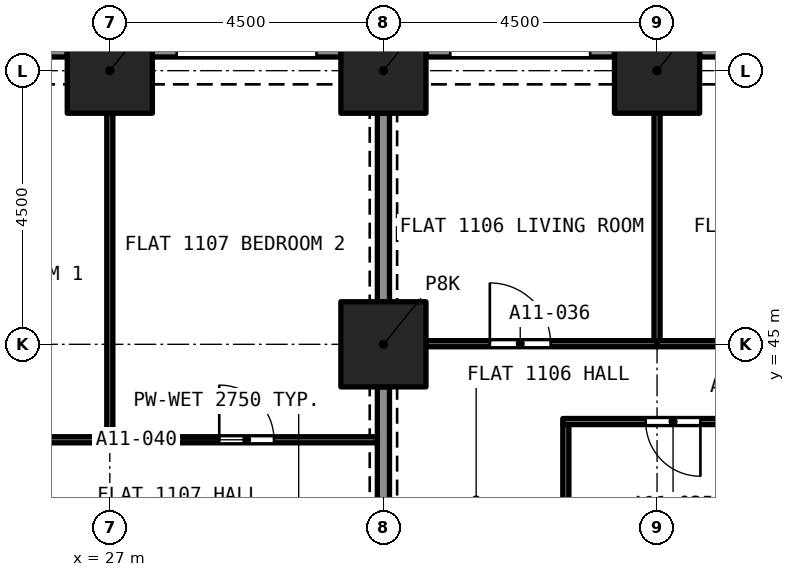
"""IFC4 building model, lengths in metres.
Left out: names, types, materials, properties, quantities, classifications, styles, units other than length and angle.
Written with IfcOpenShell. Run it as: python <this file> out.ifc"""

import sys

from ifc_helpers import new_model, si_unit, direction, frame, frame_2d, origin, origin_2d, place, context, subcontext, project, spatial, rectangle, extrude, element, fill, save


model = new_model("IFC4")
c1 = context("Model", 3, precision=1e-05, world=origin(), true_north=direction((0.0, 1.0)))
c2 = subcontext(c1, "Body", "Model", "MODEL_VIEW")
j1 = project(units=[si_unit("LENGTHUNIT", "METRE"), si_unit("PLANEANGLEUNIT", "RADIAN")], contexts=[c1])
p1 = place(None, origin())
s1 = spatial("IfcSite", under=j1, at=p1, CompositionType="ELEMENT")
p2 = place(p1, origin())
s2 = spatial("IfcBuilding", under=s1, at=p2, CompositionType="ELEMENT")
p3 = place(p2, frame((0.0, 0.0, 46.4)))
s3 = spatial("IfcBuildingStorey", under=s2, at=p3, CompositionType="ELEMENT", Elevation=46.4)
for number, where, z_axis, x_axis in (
    (1, (31.5, 45.0, 0.0), (0.0, 0.0, 1.0), (1.0, 0.0, 0.0)),
    (2, (27.0, 49.5, 0.0), (0.0, 0.0, 1.0), (1.0, 0.0, 0.0)),
    (3, (31.5, 49.5, 0.0), (0.0, 0.0, 1.0), (1.0, 0.0, 0.0)),
    (4, (36.0, 49.5, 0.0), (0.0, 0.0, 1.0), (1.0, 0.0, 0.0)),
):
    element("IfcColumn", number, at=place(p3, frame(where, z_axis=z_axis, x_axis=x_axis)), inside=s3, PredefinedType="COLUMN", context=c2, shape_type="SweptSolid", body=[
        extrude(rectangle(XDim=1.4, YDim=1.4, at=origin_2d()), origin(), (0.0, 0.0, 1.0), 3.2),
    ])
p4 = place(p3, frame((36.7, 49.875, 0.0), z_axis=(0.0, 0.0, 1.0), x_axis=(1.0, 0.0, 0.0)))
e5 = element("IfcWall", 5, at=p4, inside=s3, PredefinedType="SOLIDWALL", context=c2, shape_type="SweptSolid", body=[
    extrude(rectangle(XDim=3.1, YDim=0.3, at=frame_2d((1.55, 0.0))), origin(), (0.0, 0.0, 1.0), 3.2),
])
p5 = place(p4, frame((0.4, 0.0, 0.45)))
e6 = element("IfcOpeningElement", 6, at=p5, cuts=e5, PredefinedType="OPENING", context=c2, shape_type="SweptSolid", body=[
    extrude(rectangle(XDim=2.3, YDim=1.95, at=frame_2d((1.15, 0.975))), frame((0.0, 0.16, 0.0), z_axis=(0.0, -1.0, 0.0), x_axis=(1.0, 0.0, 0.0)), (0.0, 0.0, 1.0), 0.32),
])
p6 = place(p3, frame((32.2, 49.875, 0.0), z_axis=(0.0, 0.0, 1.0), x_axis=(1.0, 0.0, 0.0)))
e7 = element("IfcWall", 7, at=p6, inside=s3, PredefinedType="SOLIDWALL", context=c2, shape_type="SweptSolid", body=[
    extrude(rectangle(XDim=3.1, YDim=0.3, at=frame_2d((1.55, 0.0))), origin(), (0.0, 0.0, 1.0), 3.2),
])
p7 = place(p6, frame((0.4, 0.0, 0.45)))
e8 = element("IfcOpeningElement", 8, at=p7, cuts=e7, PredefinedType="OPENING", context=c2, shape_type="SweptSolid", body=[
    extrude(rectangle(XDim=2.3, YDim=1.95, at=frame_2d((1.15, 0.975))), frame((0.0, 0.16, 0.0), z_axis=(0.0, -1.0, 0.0), x_axis=(1.0, 0.0, 0.0)), (0.0, 0.0, 1.0), 0.32),
])
p8 = place(p3, frame((27.7, 49.875, 0.0), z_axis=(0.0, 0.0, 1.0), x_axis=(1.0, 0.0, 0.0)))
e9 = element("IfcWall", 9, at=p8, inside=s3, PredefinedType="SOLIDWALL", context=c2, shape_type="SweptSolid", body=[
    extrude(rectangle(XDim=3.1, YDim=0.3, at=frame_2d((1.55, 0.0))), origin(), (0.0, 0.0, 1.0), 3.2),
])
p9 = place(p8, frame((0.4, 0.0, 0.45)))
e10 = element("IfcOpeningElement", 10, at=p9, cuts=e9, PredefinedType="OPENING", context=c2, shape_type="SweptSolid", body=[
    extrude(rectangle(XDim=2.3, YDim=1.95, at=frame_2d((1.15, 0.975))), frame((0.0, 0.16, 0.0), z_axis=(0.0, -1.0, 0.0), x_axis=(1.0, 0.0, 0.0)), (0.0, 0.0, 1.0), 0.32),
])
p10 = place(p3, frame((23.2, 49.875, 0.0), z_axis=(0.0, 0.0, 1.0), x_axis=(1.0, 0.0, 0.0)))
e11 = element("IfcWall", 11, at=p10, inside=s3, PredefinedType="SOLIDWALL", context=c2, shape_type="SweptSolid", body=[
    extrude(rectangle(XDim=3.1, YDim=0.3, at=frame_2d((1.55, 0.0))), origin(), (0.0, 0.0, 1.0), 3.2),
])
p11 = place(p10, frame((0.4, 0.0, 0.45)))
e12 = element("IfcOpeningElement", 12, at=p11, cuts=e11, PredefinedType="OPENING", context=c2, shape_type="SweptSolid", body=[
    extrude(rectangle(XDim=2.3, YDim=1.95, at=frame_2d((1.15, 0.975))), frame((0.0, 0.16, 0.0), z_axis=(0.0, -1.0, 0.0), x_axis=(1.0, 0.0, 0.0)), (0.0, 0.0, 1.0), 0.32),
])
p12 = place(p3, frame((36.0, 45.01, 0.0), z_axis=(0.0, 0.0, 1.0), x_axis=(1.0, 0.0, 0.0)))
e13 = element("IfcWall", 13, at=p12, inside=s3, PredefinedType="PARTITIONING", context=c2, shape_type="SweptSolid", body=[
    extrude(rectangle(XDim=4.4, YDim=0.1, at=frame_2d((2.2, 0.0))), origin(), (0.0, 0.0, 1.0), 2.9),
])
p13 = place(p12, frame((1.8, 0.0, 0.0)))
e14 = element("IfcOpeningElement", 14, at=p13, cuts=e13, PredefinedType="OPENING", context=c2, shape_type="SweptSolid", body=[
    extrude(rectangle(XDim=0.9, YDim=2.1, at=frame_2d((0.45, 1.05))), frame((0.0, 0.06, 0.0), z_axis=(0.0, -1.0, 0.0), x_axis=(1.0, 0.0, 0.0)), (0.0, 0.0, 1.0), 0.12),
])
p14 = place(p3, frame((36.0, 45.06, 0.0), z_axis=(0.0, 0.0, 1.0), x_axis=(0.0, 1.0, 0.0)))
e15 = element("IfcWall", 15, at=p14, inside=s3, PredefinedType="PARTITIONING", context=c2, shape_type="SweptSolid", body=[
    extrude(rectangle(XDim=3.74, YDim=0.1, at=frame_2d((1.87, 0.0))), origin(), (0.0, 0.0, 1.0), 2.9),
])
p15 = place(p3, frame((38.027, 43.73, 0.0), z_axis=(0.0, 0.0, 1.0), x_axis=(-1.0, 0.0, 0.0)))
e16 = element("IfcWall", 16, at=p15, inside=s3, PredefinedType="PARTITIONING", context=c2, shape_type="SweptSolid", body=[
    extrude(rectangle(XDim=3.577, YDim=0.1, at=frame_2d((1.788, 0.0))), origin(), (0.0, 0.0, 1.0), 2.9),
])
p16 = place(p15, frame((1.313, 0.0, 0.0)))
e17 = element("IfcOpeningElement", 17, at=p16, cuts=e16, PredefinedType="OPENING", context=c2, shape_type="SweptSolid", body=[
    extrude(rectangle(XDim=0.9, YDim=2.1, at=frame_2d((0.45, 1.05))), frame((0.0, 0.06, 0.0), z_axis=(0.0, -1.0, 0.0), x_axis=(1.0, 0.0, 0.0)), (0.0, 0.0, 1.0), 0.12),
])
p17 = place(p3, frame((34.5, 40.575, 0.0), z_axis=(0.0, 0.0, 1.0), x_axis=(0.0, 1.0, 0.0)))
e18 = element("IfcWall", 18, at=p17, inside=s3, PredefinedType="PARTITIONING", context=c2, shape_type="SweptSolid", body=[
    extrude(rectangle(XDim=3.105, YDim=0.1, at=frame_2d((1.552, 0.0))), origin(), (0.0, 0.0, 1.0), 2.9),
])
p18 = place(p3, frame((32.2, 45.01, 0.0), z_axis=(0.0, 0.0, 1.0), x_axis=(1.0, 0.0, 0.0)))
e19 = element("IfcWall", 19, at=p18, inside=s3, PredefinedType="PARTITIONING", context=c2, shape_type="SweptSolid", body=[
    extrude(rectangle(XDim=3.8, YDim=0.1, at=frame_2d((1.9, 0.0))), origin(), (0.0, 0.0, 1.0), 2.9),
])
p19 = place(p18, frame((1.05, 0.0, 0.0)))
e20 = element("IfcOpeningElement", 20, at=p19, cuts=e19, PredefinedType="OPENING", context=c2, shape_type="SweptSolid", body=[
    extrude(rectangle(XDim=1.0, YDim=2.1, at=frame_2d((0.5, 1.05))), frame((0.0, 0.06, 0.0), z_axis=(0.0, -1.0, 0.0), x_axis=(1.0, 0.0, 0.0)), (0.0, 0.0, 1.0), 0.12),
])
for number, where, z_axis, x_axis in (
    (21, (31.5, 41.2, 0.0), (0.0, 0.0, 1.0), (0.0, 1.0, 0.0)),
    (22, (31.5, 45.7, 0.0), (0.0, 0.0, 1.0), (0.0, 1.0, 0.0)),
):
    element("IfcWall", number, at=place(p3, frame(where, z_axis=z_axis, x_axis=x_axis)), inside=s3, PredefinedType="PARTITIONING", context=c2, shape_type="SweptSolid", body=[
        extrude(rectangle(XDim=3.1, YDim=0.2, at=frame_2d((1.55, 0.0))), origin(), (0.0, 0.0, 1.0), 2.38),
    ])
p20 = place(p3, frame((27.0, 43.48, 0.0), z_axis=(0.0, 0.0, 1.0), x_axis=(0.0, 1.0, 0.0)))
e23 = element("IfcWall", 23, at=p20, inside=s3, PredefinedType="PARTITIONING", context=c2, shape_type="SweptSolid", body=[
    extrude(rectangle(XDim=5.32, YDim=0.1, at=frame_2d((2.66, 0.0))), origin(), (0.0, 0.0, 1.0), 2.75),
])
p21 = place(p3, frame((22.5, 43.43, 0.0), z_axis=(0.0, 0.0, 1.0), x_axis=(1.0, 0.0, 0.0)))
e24 = element("IfcWall", 24, at=p21, inside=s3, PredefinedType="PARTITIONING", context=c2, shape_type="SweptSolid", body=[
    extrude(rectangle(XDim=4.5, YDim=0.1, at=frame_2d((2.25, 0.0))), origin(), (0.0, 0.0, 1.0), 2.75),
])
p22 = place(p21, frame((1.8, 0.0, 0.0)))
e25 = element("IfcOpeningElement", 25, at=p22, cuts=e24, PredefinedType="OPENING", context=c2, shape_type="SweptSolid", body=[
    extrude(rectangle(XDim=0.9, YDim=2.1, at=frame_2d((0.45, 1.05))), frame((0.0, 0.06, 0.0), z_axis=(0.0, -1.0, 0.0), x_axis=(1.0, 0.0, 0.0)), (0.0, 0.0, 1.0), 0.12),
])
p23 = place(p3, frame((27.0, 43.43, 0.0), z_axis=(0.0, 0.0, 1.0), x_axis=(1.0, 0.0, 0.0)))
e26 = element("IfcWall", 26, at=p23, inside=s3, PredefinedType="PARTITIONING", context=c2, shape_type="SweptSolid", body=[
    extrude(rectangle(XDim=4.4, YDim=0.1, at=frame_2d((2.2, 0.0))), origin(), (0.0, 0.0, 1.0), 2.75),
])
p24 = place(p23, frame((1.8, 0.0, 0.0)))
e27 = element("IfcOpeningElement", 27, at=p24, cuts=e26, PredefinedType="OPENING", context=c2, shape_type="SweptSolid", body=[
    extrude(rectangle(XDim=0.9, YDim=2.1, at=frame_2d((0.45, 1.05))), frame((0.0, 0.06, 0.0), z_axis=(0.0, -1.0, 0.0), x_axis=(1.0, 0.0, 0.0)), (0.0, 0.0, 1.0), 0.12),
])
p25 = place(p16, origin())
e28 = element("IfcDoor", 28, at=p25, inside=s3, OperationType="SINGLE_SWING_LEFT", PredefinedType="DOOR", context=c2, shape_type="SweptSolid", body=[
    extrude(rectangle(XDim=0.9, YDim=2.1, at=frame_2d((0.45, 1.05))), frame((0.0, 0.025, 0.0), z_axis=(0.0, -1.0, 0.0), x_axis=(1.0, 0.0, 0.0)), (0.0, 0.0, 1.0), 0.05),
])
fill(e17, e28)
p26 = place(p19, origin())
e29 = element("IfcDoor", 29, at=p26, inside=s3, OperationType="SINGLE_SWING_LEFT", PredefinedType="DOOR", context=c2, shape_type="SweptSolid", body=[
    extrude(rectangle(XDim=1.0, YDim=2.1, at=frame_2d((0.5, 1.05))), frame((0.0, 0.025, 0.0), z_axis=(0.0, -1.0, 0.0), x_axis=(1.0, 0.0, 0.0)), (0.0, 0.0, 1.0), 0.05),
])
fill(e20, e29)
p27 = place(p24, origin())
e30 = element("IfcDoor", 30, at=p27, inside=s3, OperationType="SINGLE_SWING_RIGHT", PredefinedType="DOOR", context=c2, shape_type="SweptSolid", body=[
    extrude(rectangle(XDim=0.9, YDim=2.1, at=frame_2d((0.45, 1.05))), frame((0.0, 0.025, 0.0), z_axis=(0.0, -1.0, 0.0), x_axis=(1.0, 0.0, 0.0)), (0.0, 0.0, 1.0), 0.05),
])
fill(e27, e30)
save(model, sys.argv[1])
